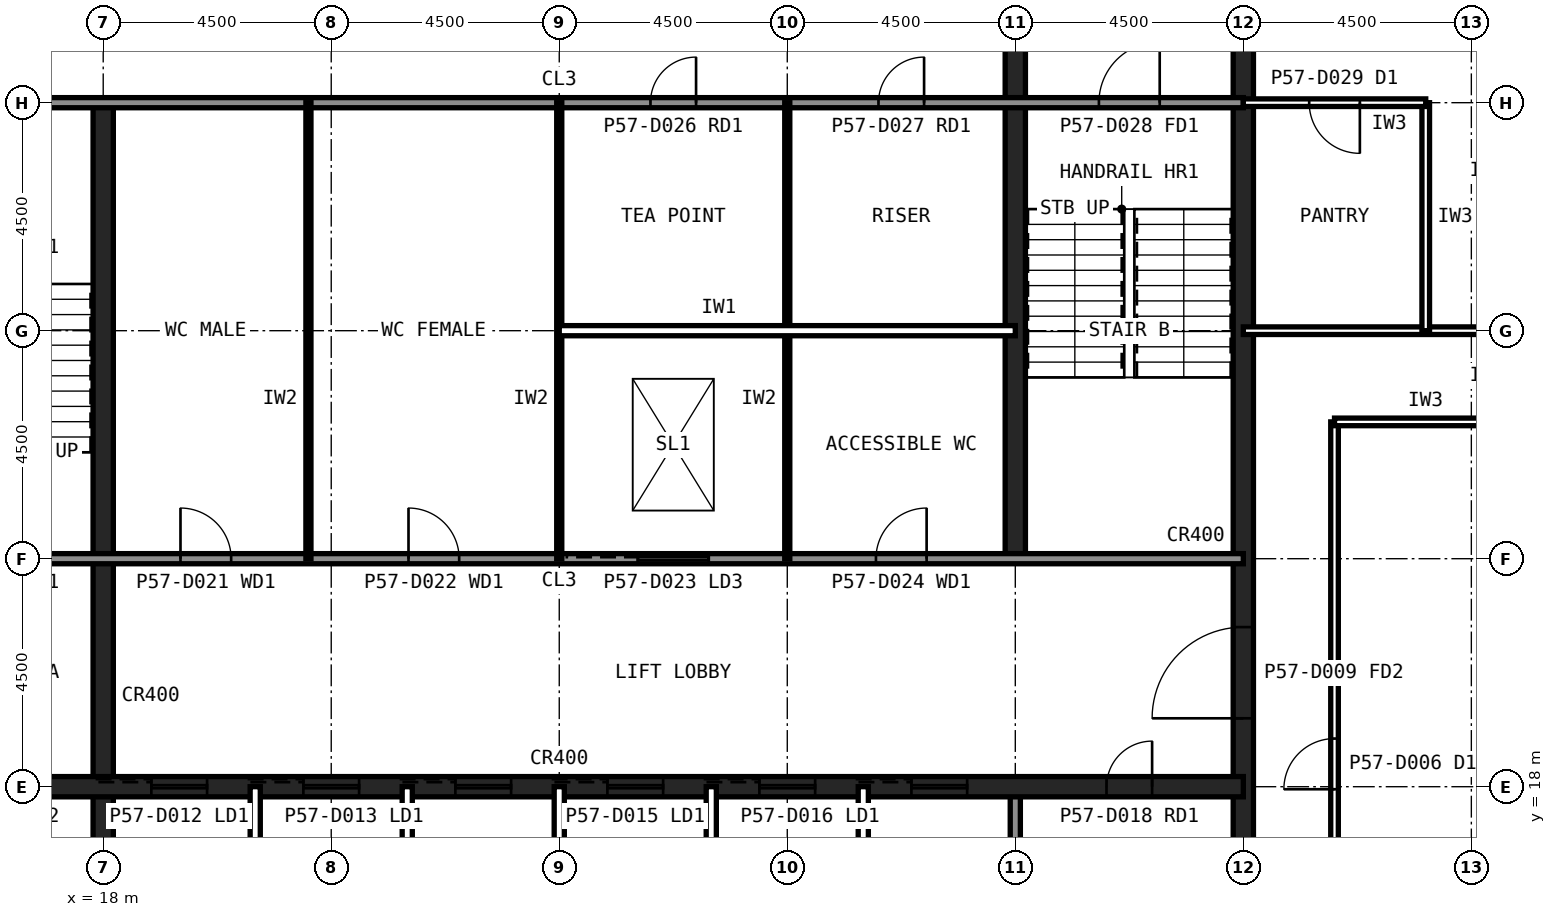
"""IFC4 building model, lengths in metres.
Left out: names, types, materials, properties, quantities, classifications, styles, units other than length and angle.
Written with IfcOpenShell. Run it as: python <this file> out.ifc"""

import sys

from ifc_helpers import new_model, si_unit, direction, frame, frame_2d, origin, place, context, subcontext, project, spatial, rectangle, extrude, element, fill, save


model = new_model("IFC4")
c1 = context("Model", 3, precision=1e-05, world=origin(), true_north=direction((0.0, 1.0)))
c2 = subcontext(c1, "Body", "Model", "MODEL_VIEW")
j1 = project(units=[si_unit("LENGTHUNIT", "METRE"), si_unit("PLANEANGLEUNIT", "RADIAN")], contexts=[c1])
p1 = place(None, origin())
s1 = spatial("IfcSite", under=j1, at=p1, CompositionType="ELEMENT")
p2 = place(p1, origin())
s2 = spatial("IfcBuilding", under=s1, at=p2, CompositionType="ELEMENT")
p3 = place(p2, frame((0.0, 0.0, 238.6)))
s3 = spatial("IfcBuildingStorey", under=s2, at=p3, CompositionType="ELEMENT", Elevation=238.6)
p4 = place(p3, frame((40.5, 13.5, 0.0), z_axis=(0.0, 0.0, 1.0), x_axis=(0.0, 1.0, 0.0)))
e1 = element("IfcWall", 1, at=p4, inside=s3, PredefinedType="SHEAR", context=c2, shape_type="SweptSolid", body=[
    extrude(rectangle(XDim=27.0, YDim=0.4, at=frame_2d((13.5, 0.0))), origin(), (0.0, 0.0, 1.0), 4.0),
])
p5 = place(p4, frame((5.85, 0.0, 0.0)))
e2 = element("IfcOpeningElement", 2, at=p5, cuts=e1, PredefinedType="OPENING", context=c2, shape_type="SweptSolid", body=[
    extrude(rectangle(XDim=1.8, YDim=2.1, at=frame_2d((0.9, 1.05))), frame((0.0, 0.21, 0.0), z_axis=(0.0, -1.0, 0.0), x_axis=(1.0, 0.0, 0.0)), (0.0, 0.0, 1.0), 0.42),
])
p6 = place(p4, frame((19.65, 0.0, 0.0)))
e3 = element("IfcOpeningElement", 3, at=p6, cuts=e1, PredefinedType="OPENING", context=c2, shape_type="SweptSolid", body=[
    extrude(rectangle(XDim=1.2, YDim=2.1, at=frame_2d((0.6, 1.05))), frame((0.0, 0.21, 0.0), z_axis=(0.0, -1.0, 0.0), x_axis=(1.0, 0.0, 0.0)), (0.0, 0.0, 1.0), 0.42),
])
p7 = place(p3, frame((18.0, 13.5, 0.0), z_axis=(0.0, 0.0, 1.0), x_axis=(0.0, 1.0, 0.0)))
e4 = element("IfcWall", 4, at=p7, inside=s3, PredefinedType="SHEAR", context=c2, shape_type="SweptSolid", body=[
    extrude(rectangle(XDim=18.0, YDim=0.4, at=frame_2d((9.0, 0.0))), origin(), (0.0, 0.0, 1.0), 4.0),
])
p8 = place(p3, frame((36.0, 13.5, 0.0), z_axis=(0.0, 0.0, 1.0), x_axis=(0.0, 1.0, 0.0)))
e5 = element("IfcWall", 5, at=p8, inside=s3, PredefinedType="SOLIDWALL", context=c2, shape_type="SweptSolid", body=[
    extrude(rectangle(XDim=4.5, YDim=0.2, at=frame_2d((2.25, 0.0))), origin(), (0.0, 0.0, 1.0), 3.84),
])
p9 = place(p3, frame((36.0, 22.5, 0.0), z_axis=(0.0, 0.0, 1.0), x_axis=(0.0, 1.0, 0.0)))
e6 = element("IfcWall", 6, at=p9, inside=s3, PredefinedType="SHEAR", context=c2, shape_type="SweptSolid", body=[
    extrude(rectangle(XDim=18.0, YDim=0.4, at=frame_2d((9.0, 0.0))), origin(), (0.0, 0.0, 1.0), 4.0),
])
p10 = place(p3, frame((13.5, 18.0, 0.0), z_axis=(0.0, 0.0, 1.0), x_axis=(1.0, 0.0, 0.0)))
e7 = element("IfcWall", 7, at=p10, inside=s3, PredefinedType="SHEAR", context=c2, shape_type="SweptSolid", body=[
    extrude(rectangle(XDim=27.0, YDim=0.4, at=frame_2d((13.5, 0.0))), origin(), (0.0, 0.0, 1.0), 4.0),
])
p11 = place(p10, frame((24.3, 0.0, 0.0)))
e8 = element("IfcOpeningElement", 8, at=p11, cuts=e7, PredefinedType="OPENING", context=c2, shape_type="SweptSolid", body=[
    extrude(rectangle(XDim=0.9, YDim=2.1, at=frame_2d((0.45, 1.05))), frame((0.0, 0.21, 0.0), z_axis=(0.0, -1.0, 0.0), x_axis=(1.0, 0.0, 0.0)), (0.0, 0.0, 1.0), 0.42),
])
p12 = place(p10, frame((5.45, 0.0, 0.0)))
e9 = element("IfcOpeningElement", 9, at=p12, cuts=e7, PredefinedType="OPENING", context=c2, shape_type="SweptSolid", body=[
    extrude(rectangle(XDim=1.1, YDim=2.1, at=frame_2d((0.55, 1.05))), frame((0.0, 0.21, 0.0), z_axis=(0.0, -1.0, 0.0), x_axis=(1.0, 0.0, 0.0)), (0.0, 0.0, 1.0), 0.42),
])
p13 = place(p10, frame((8.45, 0.0, 0.0)))
e10 = element("IfcOpeningElement", 10, at=p13, cuts=e7, PredefinedType="OPENING", context=c2, shape_type="SweptSolid", body=[
    extrude(rectangle(XDim=1.1, YDim=2.1, at=frame_2d((0.55, 1.05))), frame((0.0, 0.21, 0.0), z_axis=(0.0, -1.0, 0.0), x_axis=(1.0, 0.0, 0.0)), (0.0, 0.0, 1.0), 0.42),
])
p14 = place(p10, frame((11.45, 0.0, 0.0)))
e11 = element("IfcOpeningElement", 11, at=p14, cuts=e7, PredefinedType="OPENING", context=c2, shape_type="SweptSolid", body=[
    extrude(rectangle(XDim=1.1, YDim=2.1, at=frame_2d((0.55, 1.05))), frame((0.0, 0.21, 0.0), z_axis=(0.0, -1.0, 0.0), x_axis=(1.0, 0.0, 0.0)), (0.0, 0.0, 1.0), 0.42),
])
p15 = place(p10, frame((14.45, 0.0, 0.0)))
e12 = element("IfcOpeningElement", 12, at=p15, cuts=e7, PredefinedType="OPENING", context=c2, shape_type="SweptSolid", body=[
    extrude(rectangle(XDim=1.1, YDim=2.1, at=frame_2d((0.55, 1.05))), frame((0.0, 0.21, 0.0), z_axis=(0.0, -1.0, 0.0), x_axis=(1.0, 0.0, 0.0)), (0.0, 0.0, 1.0), 0.42),
])
p16 = place(p10, frame((17.45, 0.0, 0.0)))
e13 = element("IfcOpeningElement", 13, at=p16, cuts=e7, PredefinedType="OPENING", context=c2, shape_type="SweptSolid", body=[
    extrude(rectangle(XDim=1.1, YDim=2.1, at=frame_2d((0.55, 1.05))), frame((0.0, 0.21, 0.0), z_axis=(0.0, -1.0, 0.0), x_axis=(1.0, 0.0, 0.0)), (0.0, 0.0, 1.0), 0.42),
])
p17 = place(p10, frame((20.45, 0.0, 0.0)))
e14 = element("IfcOpeningElement", 14, at=p17, cuts=e7, PredefinedType="OPENING", context=c2, shape_type="SweptSolid", body=[
    extrude(rectangle(XDim=1.1, YDim=2.1, at=frame_2d((0.55, 1.05))), frame((0.0, 0.21, 0.0), z_axis=(0.0, -1.0, 0.0), x_axis=(1.0, 0.0, 0.0)), (0.0, 0.0, 1.0), 0.42),
])
p18 = place(p10, frame((1.6, 0.0, 0.0)))
e15 = element("IfcOpeningElement", 15, at=p18, cuts=e7, PredefinedType="OPENING", context=c2, shape_type="SweptSolid", body=[
    extrude(rectangle(XDim=1.3, YDim=2.2, at=frame_2d((0.65, 1.1))), frame((0.0, 0.21, 0.0), z_axis=(0.0, -1.0, 0.0), x_axis=(1.0, 0.0, 0.0)), (0.0, 0.0, 1.0), 0.42),
])
p19 = place(p3, frame((13.5, 22.5, 0.0), z_axis=(0.0, 0.0, 1.0), x_axis=(1.0, 0.0, 0.0)))
e16 = element("IfcWall", 16, at=p19, inside=s3, PredefinedType="SOLIDWALL", context=c2, shape_type="SweptSolid", body=[
    extrude(rectangle(XDim=27.0, YDim=0.2, at=frame_2d((13.5, 0.0))), origin(), (0.0, 0.0, 1.0), 3.84),
])
p20 = place(p19, frame((1.65, 0.0, 0.0)))
e17 = element("IfcOpeningElement", 17, at=p20, cuts=e16, PredefinedType="OPENING", context=c2, shape_type="SweptSolid", body=[
    extrude(rectangle(XDim=1.2, YDim=2.1, at=frame_2d((0.6, 1.05))), frame((0.0, 0.11, 0.0), z_axis=(0.0, -1.0, 0.0), x_axis=(1.0, 0.0, 0.0)), (0.0, 0.0, 1.0), 0.22),
])
p21 = place(p19, frame((6.025, 0.0, 0.0)))
e18 = element("IfcOpeningElement", 18, at=p21, cuts=e16, PredefinedType="OPENING", context=c2, shape_type="SweptSolid", body=[
    extrude(rectangle(XDim=1.0, YDim=2.1, at=frame_2d((0.5, 1.05))), frame((0.0, 0.11, 0.0), z_axis=(0.0, -1.0, 0.0), x_axis=(1.0, 0.0, 0.0)), (0.0, 0.0, 1.0), 0.22),
])
p22 = place(p19, frame((10.525, 0.0, 0.0)))
e19 = element("IfcOpeningElement", 19, at=p22, cuts=e16, PredefinedType="OPENING", context=c2, shape_type="SweptSolid", body=[
    extrude(rectangle(XDim=1.0, YDim=2.1, at=frame_2d((0.5, 1.05))), frame((0.0, 0.11, 0.0), z_axis=(0.0, -1.0, 0.0), x_axis=(1.0, 0.0, 0.0)), (0.0, 0.0, 1.0), 0.22),
])
p23 = place(p19, frame((19.75, 0.0, 0.0)))
e20 = element("IfcOpeningElement", 20, at=p23, cuts=e16, PredefinedType="OPENING", context=c2, shape_type="SweptSolid", body=[
    extrude(rectangle(XDim=1.0, YDim=2.1, at=frame_2d((0.5, 1.05))), frame((0.0, 0.11, 0.0), z_axis=(0.0, -1.0, 0.0), x_axis=(1.0, 0.0, 0.0)), (0.0, 0.0, 1.0), 0.22),
])
p24 = place(p19, frame((15.05, 0.0, 0.0)))
e21 = element("IfcOpeningElement", 21, at=p24, cuts=e16, PredefinedType="OPENING", context=c2, shape_type="SweptSolid", body=[
    extrude(rectangle(XDim=1.4, YDim=2.4, at=frame_2d((0.7, 1.2))), frame((0.0, 0.11, 0.0), z_axis=(0.0, -1.0, 0.0), x_axis=(1.0, 0.0, 0.0)), (0.0, 0.0, 1.0), 0.22),
])
p25 = place(p3, frame((13.5, 31.5, 0.0), z_axis=(0.0, 0.0, 1.0), x_axis=(1.0, 0.0, 0.0)))
e22 = element("IfcWall", 22, at=p25, inside=s3, PredefinedType="SOLIDWALL", context=c2, shape_type="SweptSolid", body=[
    extrude(rectangle(XDim=27.0, YDim=0.2, at=frame_2d((13.5, 0.0))), origin(), (0.0, 0.0, 1.0), 3.84),
])
p26 = place(p25, frame((24.15, 0.0, 0.0)))
e23 = element("IfcOpeningElement", 23, at=p26, cuts=e22, PredefinedType="OPENING", context=c2, shape_type="SweptSolid", body=[
    extrude(rectangle(XDim=1.2, YDim=2.1, at=frame_2d((0.6, 1.05))), frame((0.0, 0.11, 0.0), z_axis=(0.0, -1.0, 0.0), x_axis=(1.0, 0.0, 0.0)), (0.0, 0.0, 1.0), 0.22),
])
p27 = place(p25, frame((15.3, 0.0, 0.0)))
e24 = element("IfcOpeningElement", 24, at=p27, cuts=e22, PredefinedType="OPENING", context=c2, shape_type="SweptSolid", body=[
    extrude(rectangle(XDim=0.9, YDim=2.1, at=frame_2d((0.45, 1.05))), frame((0.0, 0.11, 0.0), z_axis=(0.0, -1.0, 0.0), x_axis=(1.0, 0.0, 0.0)), (0.0, 0.0, 1.0), 0.22),
])
p28 = place(p25, frame((19.8, 0.0, 0.0)))
e25 = element("IfcOpeningElement", 25, at=p28, cuts=e22, PredefinedType="OPENING", context=c2, shape_type="SweptSolid", body=[
    extrude(rectangle(XDim=0.9, YDim=2.1, at=frame_2d((0.45, 1.05))), frame((0.0, 0.11, 0.0), z_axis=(0.0, -1.0, 0.0), x_axis=(1.0, 0.0, 0.0)), (0.0, 0.0, 1.0), 0.22),
])
for number, where, z_axis, x_axis in (
    (26, (21.0, 13.5, 0.0), (0.0, 0.0, 1.0), (0.0, 1.0, 0.0)),
    (27, (24.0, 13.5, 0.0), (0.0, 0.0, 1.0), (0.0, 1.0, 0.0)),
    (28, (27.0, 13.5, 0.0), (0.0, 0.0, 1.0), (0.0, 1.0, 0.0)),
    (29, (30.0, 13.5, 0.0), (0.0, 0.0, 1.0), (0.0, 1.0, 0.0)),
    (30, (33.0, 13.5, 0.0), (0.0, 0.0, 1.0), (0.0, 1.0, 0.0)),
):
    element("IfcWall", number, at=place(p3, frame(where, z_axis=z_axis, x_axis=x_axis)), inside=s3, PredefinedType="PARTITIONING", context=c2, shape_type="SweptSolid", body=[
        extrude(rectangle(XDim=4.5, YDim=0.2, at=frame_2d((2.25, 0.0))), origin(), (0.0, 0.0, 1.0), 3.84),
    ])
for number, where, z_axis, x_axis in (
    (31, (22.05, 22.5, 0.0), (0.0, 0.0, 1.0), (0.0, 1.0, 0.0)),
    (32, (27.0, 22.5, 0.0), (0.0, 0.0, 1.0), (0.0, 1.0, 0.0)),
    (33, (31.5, 22.5, 0.0), (0.0, 0.0, 1.0), (0.0, 1.0, 0.0)),
):
    element("IfcWall", number, at=place(p3, frame(where, z_axis=z_axis, x_axis=x_axis)), inside=s3, PredefinedType="PLUMBINGWALL", context=c2, shape_type="SweptSolid", body=[
        extrude(rectangle(XDim=9.0, YDim=0.1, at=frame_2d((4.5, 0.0))), origin(), (0.0, 0.0, 1.0), 3.84),
    ])
p29 = place(p3, frame((27.0, 27.0, 0.0), z_axis=(0.0, 0.0, 1.0), x_axis=(1.0, 0.0, 0.0)))
e34 = element("IfcWall", 34, at=p29, inside=s3, PredefinedType="PARTITIONING", context=c2, shape_type="SweptSolid", body=[
    extrude(rectangle(XDim=9.0, YDim=0.2, at=frame_2d((4.5, 0.0))), origin(), (0.0, 0.0, 1.0), 3.84),
])
p30 = place(p3, frame((40.5, 27.0, 0.0), z_axis=(0.0, 0.0, 1.0), x_axis=(1.0, 0.0, 0.0)))
e35 = element("IfcWall", 35, at=p30, inside=s3, PredefinedType="PARTITIONING", context=c2, shape_type="SweptSolid", body=[
    extrude(rectangle(XDim=13.165, YDim=0.15, at=frame_2d((6.583, 0.0))), origin(), (0.0, 0.0, 1.0), 2.989),
])
p31 = place(p3, frame((42.3, 11.7, 0.0), z_axis=(0.0, 0.0, 1.0), x_axis=(0.0, 1.0, 0.0)))
e36 = element("IfcWall", 36, at=p31, inside=s3, PredefinedType="PARTITIONING", context=c2, shape_type="SweptSolid", body=[
    extrude(rectangle(XDim=13.5, YDim=0.15, at=frame_2d((6.75, 0.0))), origin(), (0.0, 0.0, 1.0), 3.84),
])
p32 = place(p31, frame((6.25, 0.0, 0.0)))
e37 = element("IfcOpeningElement", 37, at=p32, cuts=e36, PredefinedType="OPENING", context=c2, shape_type="SweptSolid", body=[
    extrude(rectangle(XDim=1.0, YDim=2.1, at=frame_2d((0.5, 1.05))), frame((0.0, 0.085, 0.0), z_axis=(0.0, -1.0, 0.0), x_axis=(1.0, 0.0, 0.0)), (0.0, 0.0, 1.0), 0.17),
])
p33 = place(p3, frame((42.3, 25.2, 0.0), z_axis=(0.0, 0.0, 1.0), x_axis=(1.0, 0.0, 0.0)))
e38 = element("IfcWall", 38, at=p33, inside=s3, PredefinedType="PARTITIONING", context=c2, shape_type="SweptSolid", body=[
    extrude(rectangle(XDim=3.6, YDim=0.15, at=frame_2d((1.8, 0.0))), origin(), (0.0, 0.0, 1.0), 3.84),
])
p34 = place(p3, frame((44.1, 27.0, 0.0), z_axis=(0.0, 0.0, 1.0), x_axis=(0.0, 1.0, 0.0)))
e39 = element("IfcWall", 39, at=p34, inside=s3, PredefinedType="PARTITIONING", context=c2, shape_type="SweptSolid", body=[
    extrude(rectangle(XDim=4.5, YDim=0.15, at=frame_2d((2.25, 0.0))), origin(), (0.0, 0.0, 1.0), 3.84),
])
p35 = place(p3, frame((44.1, 31.5, 0.0), z_axis=(0.0, 0.0, 1.0), x_axis=(-1.0, 0.0, 0.0)))
e40 = element("IfcWall", 40, at=p35, inside=s3, PredefinedType="PARTITIONING", context=c2, shape_type="SweptSolid", body=[
    extrude(rectangle(XDim=3.6, YDim=0.15, at=frame_2d((1.8, 0.0))), origin(), (0.0, 0.0, 1.0), 2.989),
])
p36 = place(p35, frame((1.3, 0.0, 0.0)))
e41 = element("IfcOpeningElement", 41, at=p36, cuts=e40, PredefinedType="OPENING", context=c2, shape_type="SweptSolid", body=[
    extrude(rectangle(XDim=1.0, YDim=2.1, at=frame_2d((0.5, 1.05))), frame((0.0, 0.085, 0.0), z_axis=(0.0, -1.0, 0.0), x_axis=(1.0, 0.0, 0.0)), (0.0, 0.0, 1.0), 0.17),
])
p37 = place(p5, origin())
e42 = element("IfcDoor", 42, at=p37, inside=s3, OperationType="SINGLE_SWING_LEFT", PredefinedType="DOOR", context=c2, shape_type="SweptSolid", body=[
    extrude(rectangle(XDim=1.8, YDim=2.1, at=frame_2d((0.9, 1.05))), frame((0.0, 0.025, 0.0), z_axis=(0.0, -1.0, 0.0), x_axis=(1.0, 0.0, 0.0)), (0.0, 0.0, 1.0), 0.05),
])
fill(e2, e42)
p38 = place(p26, origin())
e43 = element("IfcDoor", 43, at=p38, inside=s3, OperationType="SINGLE_SWING_RIGHT", PredefinedType="DOOR", context=c2, shape_type="SweptSolid", body=[
    extrude(rectangle(XDim=1.2, YDim=2.1, at=frame_2d((0.6, 1.05))), frame((0.0, 0.025, 0.0), z_axis=(0.0, -1.0, 0.0), x_axis=(1.0, 0.0, 0.0)), (0.0, 0.0, 1.0), 0.05),
])
fill(e23, e43)
p39 = place(p21, origin())
e44 = element("IfcDoor", 44, at=p39, inside=s3, OperationType="SINGLE_SWING_LEFT", PredefinedType="DOOR", context=c2, shape_type="SweptSolid", body=[
    extrude(rectangle(XDim=1.0, YDim=2.1, at=frame_2d((0.5, 1.05))), frame((0.0, 0.025, 0.0), z_axis=(0.0, -1.0, 0.0), x_axis=(1.0, 0.0, 0.0)), (0.0, 0.0, 1.0), 0.05),
])
fill(e18, e44)
p40 = place(p22, origin())
e45 = element("IfcDoor", 45, at=p40, inside=s3, OperationType="SINGLE_SWING_LEFT", PredefinedType="DOOR", context=c2, shape_type="SweptSolid", body=[
    extrude(rectangle(XDim=1.0, YDim=2.1, at=frame_2d((0.5, 1.05))), frame((0.0, 0.025, 0.0), z_axis=(0.0, -1.0, 0.0), x_axis=(1.0, 0.0, 0.0)), (0.0, 0.0, 1.0), 0.05),
])
fill(e19, e45)
p41 = place(p23, origin())
e46 = element("IfcDoor", 46, at=p41, inside=s3, OperationType="SINGLE_SWING_RIGHT", PredefinedType="DOOR", context=c2, shape_type="SweptSolid", body=[
    extrude(rectangle(XDim=1.0, YDim=2.1, at=frame_2d((0.5, 1.05))), frame((0.0, 0.025, 0.0), z_axis=(0.0, -1.0, 0.0), x_axis=(1.0, 0.0, 0.0)), (0.0, 0.0, 1.0), 0.05),
])
fill(e20, e46)
p42 = place(p27, origin())
e47 = element("IfcDoor", 47, at=p42, inside=s3, OperationType="SINGLE_SWING_RIGHT", PredefinedType="DOOR", context=c2, shape_type="SweptSolid", body=[
    extrude(rectangle(XDim=0.9, YDim=2.1, at=frame_2d((0.45, 1.05))), frame((0.0, 0.025, 0.0), z_axis=(0.0, -1.0, 0.0), x_axis=(1.0, 0.0, 0.0)), (0.0, 0.0, 1.0), 0.05),
])
fill(e24, e47)
p43 = place(p28, origin())
e48 = element("IfcDoor", 48, at=p43, inside=s3, OperationType="SINGLE_SWING_RIGHT", PredefinedType="DOOR", context=c2, shape_type="SweptSolid", body=[
    extrude(rectangle(XDim=0.9, YDim=2.1, at=frame_2d((0.45, 1.05))), frame((0.0, 0.025, 0.0), z_axis=(0.0, -1.0, 0.0), x_axis=(1.0, 0.0, 0.0)), (0.0, 0.0, 1.0), 0.05),
])
fill(e25, e48)
p44 = place(p11, origin())
e49 = element("IfcDoor", 49, at=p44, inside=s3, OperationType="SINGLE_SWING_RIGHT", PredefinedType="DOOR", context=c2, shape_type="SweptSolid", body=[
    extrude(rectangle(XDim=0.9, YDim=2.1, at=frame_2d((0.45, 1.05))), frame((0.0, 0.025, 0.0), z_axis=(0.0, -1.0, 0.0), x_axis=(1.0, 0.0, 0.0)), (0.0, 0.0, 1.0), 0.05),
])
fill(e8, e49)
p45 = place(p12, origin())
e50 = element("IfcDoor", 50, at=p45, inside=s3, OperationType="SLIDING_TO_LEFT", PredefinedType="DOOR", context=c2, shape_type="SweptSolid", body=[
    extrude(rectangle(XDim=1.1, YDim=2.1, at=frame_2d((0.55, 1.05))), frame((0.0, 0.025, 0.0), z_axis=(0.0, -1.0, 0.0), x_axis=(1.0, 0.0, 0.0)), (0.0, 0.0, 1.0), 0.05),
])
fill(e9, e50)
p46 = place(p13, origin())
e51 = element("IfcDoor", 51, at=p46, inside=s3, OperationType="SLIDING_TO_LEFT", PredefinedType="DOOR", context=c2, shape_type="SweptSolid", body=[
    extrude(rectangle(XDim=1.1, YDim=2.1, at=frame_2d((0.55, 1.05))), frame((0.0, 0.025, 0.0), z_axis=(0.0, -1.0, 0.0), x_axis=(1.0, 0.0, 0.0)), (0.0, 0.0, 1.0), 0.05),
])
fill(e10, e51)
p47 = place(p14, origin())
e52 = element("IfcDoor", 52, at=p47, inside=s3, OperationType="SLIDING_TO_LEFT", PredefinedType="DOOR", context=c2, shape_type="SweptSolid", body=[
    extrude(rectangle(XDim=1.1, YDim=2.1, at=frame_2d((0.55, 1.05))), frame((0.0, 0.025, 0.0), z_axis=(0.0, -1.0, 0.0), x_axis=(1.0, 0.0, 0.0)), (0.0, 0.0, 1.0), 0.05),
])
fill(e11, e52)
p48 = place(p15, origin())
e53 = element("IfcDoor", 53, at=p48, inside=s3, OperationType="SLIDING_TO_LEFT", PredefinedType="DOOR", context=c2, shape_type="SweptSolid", body=[
    extrude(rectangle(XDim=1.1, YDim=2.1, at=frame_2d((0.55, 1.05))), frame((0.0, 0.025, 0.0), z_axis=(0.0, -1.0, 0.0), x_axis=(1.0, 0.0, 0.0)), (0.0, 0.0, 1.0), 0.05),
])
fill(e12, e53)
p49 = place(p16, origin())
e54 = element("IfcDoor", 54, at=p49, inside=s3, OperationType="SLIDING_TO_LEFT", PredefinedType="DOOR", context=c2, shape_type="SweptSolid", body=[
    extrude(rectangle(XDim=1.1, YDim=2.1, at=frame_2d((0.55, 1.05))), frame((0.0, 0.025, 0.0), z_axis=(0.0, -1.0, 0.0), x_axis=(1.0, 0.0, 0.0)), (0.0, 0.0, 1.0), 0.05),
])
fill(e13, e54)
p50 = place(p17, origin())
e55 = element("IfcDoor", 55, at=p50, inside=s3, OperationType="SLIDING_TO_LEFT", PredefinedType="DOOR", context=c2, shape_type="SweptSolid", body=[
    extrude(rectangle(XDim=1.1, YDim=2.1, at=frame_2d((0.55, 1.05))), frame((0.0, 0.025, 0.0), z_axis=(0.0, -1.0, 0.0), x_axis=(1.0, 0.0, 0.0)), (0.0, 0.0, 1.0), 0.05),
])
fill(e14, e55)
p51 = place(p24, origin())
e56 = element("IfcDoor", 56, at=p51, inside=s3, OperationType="SLIDING_TO_LEFT", PredefinedType="DOOR", context=c2, shape_type="SweptSolid", body=[
    extrude(rectangle(XDim=1.4, YDim=2.4, at=frame_2d((0.7, 1.2))), frame((0.0, 0.025, 0.0), z_axis=(0.0, -1.0, 0.0), x_axis=(1.0, 0.0, 0.0)), (0.0, 0.0, 1.0), 0.05),
])
fill(e21, e56)
p52 = place(p32, origin())
e57 = element("IfcDoor", 57, at=p52, inside=s3, OperationType="SINGLE_SWING_LEFT", PredefinedType="DOOR", context=c2, shape_type="SweptSolid", body=[
    extrude(rectangle(XDim=1.0, YDim=2.1, at=frame_2d((0.5, 1.05))), frame((0.0, 0.025, 0.0), z_axis=(0.0, -1.0, 0.0), x_axis=(1.0, 0.0, 0.0)), (0.0, 0.0, 1.0), 0.05),
])
fill(e37, e57)
p53 = place(p36, origin())
e58 = element("IfcDoor", 58, at=p53, inside=s3, OperationType="SINGLE_SWING_LEFT", PredefinedType="DOOR", context=c2, shape_type="SweptSolid", body=[
    extrude(rectangle(XDim=1.0, YDim=2.1, at=frame_2d((0.5, 1.05))), frame((0.0, 0.025, 0.0), z_axis=(0.0, -1.0, 0.0), x_axis=(1.0, 0.0, 0.0)), (0.0, 0.0, 1.0), 0.05),
])
fill(e41, e58)
save(model, sys.argv[1])
